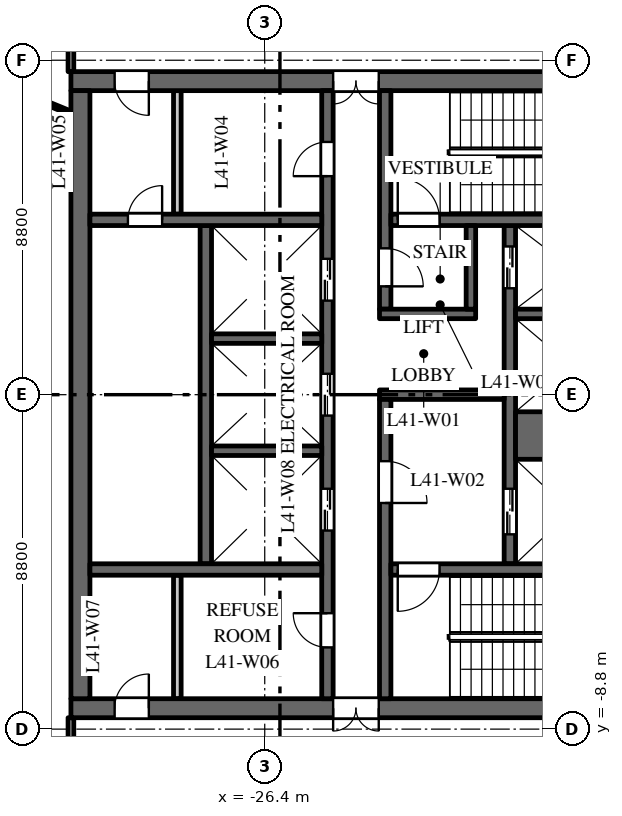
"""IFC4 building model, lengths in metres.
Left out: names, types, materials, properties, quantities, classifications, styles, units other than length and angle.
Written with IfcOpenShell. Run it as: python <this file> out.ifc"""

import sys

from ifc_helpers import new_model, si_unit, direction, frame, frame_2d, origin, place, context, subcontext, project, spatial, rectangle, extrude, element, fill, save


model = new_model("IFC4")
c1 = context("Model", 3, precision=1e-05, world=origin(), true_north=direction((0.0, 1.0)))
c2 = subcontext(c1, "Body", "Model", "MODEL_VIEW")
j1 = project(units=[si_unit("LENGTHUNIT", "METRE"), si_unit("PLANEANGLEUNIT", "RADIAN")], contexts=[c1])
p1 = place(None, origin())
s1 = spatial("IfcSite", under=j1, at=p1, CompositionType="ELEMENT")
p2 = place(p1, origin())
s2 = spatial("IfcBuilding", under=s1, at=p2, CompositionType="ELEMENT")
p3 = place(p2, frame((0.0, 0.0, 178.0)))
s3 = spatial("IfcBuildingStorey", under=s2, at=p3, CompositionType="ELEMENT", Elevation=178.0)
p4 = place(p3, frame((-16.5, 8.25, 0.0), z_axis=(0.0, 0.0, 1.0), x_axis=(-1.0, 0.0, 0.0)))
e1 = element("IfcWall", 1, at=p4, inside=s3, PredefinedType="SHEAR", context=c2, shape_type="SweptSolid", body=[
    extrude(rectangle(XDim=15.0, YDim=0.5, at=frame_2d((7.5, 0.0))), origin(), (0.0, 0.0, 1.0), 3.7),
])
p5 = place(p4, frame((6.9, 0.0, 0.0)))
e2 = element("IfcOpeningElement", 2, at=p5, cuts=e1, PredefinedType="OPENING", context=c2, shape_type="SweptSolid", body=[
    extrude(rectangle(XDim=1.2, YDim=2.1, at=frame_2d((0.6, 1.05))), frame((0.0, 0.26, 0.0), z_axis=(0.0, -1.0, 0.0), x_axis=(1.0, 0.0, 0.0)), (0.0, 0.0, 1.0), 0.52),
])
p6 = place(p4, frame((12.95, 0.0, 0.0)))
e3 = element("IfcOpeningElement", 3, at=p6, cuts=e1, PredefinedType="OPENING", context=c2, shape_type="SweptSolid", body=[
    extrude(rectangle(XDim=0.9, YDim=2.1, at=frame_2d((0.45, 1.05))), frame((0.0, 0.26, 0.0), z_axis=(0.0, -1.0, 0.0), x_axis=(1.0, 0.0, 0.0)), (0.0, 0.0, 1.0), 0.52),
])
p7 = place(p3, frame((-16.5, -8.25, 0.0), z_axis=(0.0, 0.0, 1.0), x_axis=(-1.0, 0.0, 0.0)))
e4 = element("IfcWall", 4, at=p7, inside=s3, PredefinedType="SHEAR", context=c2, shape_type="SweptSolid", body=[
    extrude(rectangle(XDim=15.0, YDim=0.5, at=frame_2d((7.5, 0.0))), origin(), (0.0, 0.0, 1.0), 3.7),
])
p8 = place(p7, frame((6.9, 0.0, 0.0)))
e5 = element("IfcOpeningElement", 5, at=p8, cuts=e4, PredefinedType="OPENING", context=c2, shape_type="SweptSolid", body=[
    extrude(rectangle(XDim=1.2, YDim=2.1, at=frame_2d((0.6, 1.05))), frame((0.0, 0.26, 0.0), z_axis=(0.0, -1.0, 0.0), x_axis=(1.0, 0.0, 0.0)), (0.0, 0.0, 1.0), 0.52),
])
p9 = place(p7, frame((12.95, 0.0, 0.0)))
e6 = element("IfcOpeningElement", 6, at=p9, cuts=e4, PredefinedType="OPENING", context=c2, shape_type="SweptSolid", body=[
    extrude(rectangle(XDim=0.9, YDim=2.1, at=frame_2d((0.45, 1.05))), frame((0.0, 0.26, 0.0), z_axis=(0.0, -1.0, 0.0), x_axis=(1.0, 0.0, 0.0)), (0.0, 0.0, 1.0), 0.52),
])
p10 = place(p3, frame((-27.95, -4.45, 0.0), z_axis=(0.0, 0.0, 1.0), x_axis=(0.0, 1.0, 0.0)))
e7 = element("IfcWall", 7, at=p10, inside=s3, PredefinedType="SHEAR", context=c2, shape_type="SweptSolid", body=[
    extrude(rectangle(XDim=8.9, YDim=0.3, at=frame_2d((4.45, 0.0))), origin(), (0.0, 0.0, 1.0), 3.7),
])
p11 = place(p3, frame((-19.95, -4.45, 0.0), z_axis=(0.0, 0.0, 1.0), x_axis=(0.0, 1.0, 0.0)))
e8 = element("IfcWall", 8, at=p11, inside=s3, PredefinedType="SHEAR", context=c2, shape_type="SweptSolid", body=[
    extrude(rectangle(XDim=8.9, YDim=0.3, at=frame_2d((4.45, 0.0))), origin(), (0.0, 0.0, 1.0), 3.7),
])
p12 = place(p11, frame((0.775, 0.0, 0.0)))
e9 = element("IfcOpeningElement", 9, at=p12, cuts=e8, PredefinedType="OPENING", context=c2, shape_type="SweptSolid", body=[
    extrude(rectangle(XDim=1.2, YDim=2.1, at=frame_2d((0.6, 1.05))), frame((0.0, 0.16, 0.0), z_axis=(0.0, -1.0, 0.0), x_axis=(1.0, 0.0, 0.0)), (0.0, 0.0, 1.0), 0.32),
])
p13 = place(p11, frame((7.25, 0.0, 0.0)))
e10 = element("IfcOpeningElement", 10, at=p13, cuts=e8, PredefinedType="OPENING", context=c2, shape_type="SweptSolid", body=[
    extrude(rectangle(XDim=1.1, YDim=2.1, at=frame_2d((0.55, 1.05))), frame((0.0, 0.16, 0.0), z_axis=(0.0, -1.0, 0.0), x_axis=(1.0, 0.0, 0.0)), (0.0, 0.0, 1.0), 0.32),
])
p14 = place(p3, frame((-24.75, -8.0, 0.0), z_axis=(0.0, 0.0, 1.0), x_axis=(0.0, 1.0, 0.0)))
e11 = element("IfcWall", 11, at=p14, inside=s3, PredefinedType="SHEAR", context=c2, shape_type="SweptSolid", body=[
    extrude(rectangle(XDim=16.0, YDim=0.3, at=frame_2d((8.0, 0.0))), origin(), (0.0, 0.0, 1.0), 3.7),
])
p15 = place(p14, frame((4.425, 0.0, 0.0)))
e12 = element("IfcOpeningElement", 12, at=p15, cuts=e11, PredefinedType="OPENING", context=c2, shape_type="SweptSolid", body=[
    extrude(rectangle(XDim=1.1, YDim=2.1, at=frame_2d((0.55, 1.05))), frame((0.0, 0.16, 0.0), z_axis=(0.0, -1.0, 0.0), x_axis=(1.0, 0.0, 0.0)), (0.0, 0.0, 1.0), 0.32),
])
p16 = place(p14, frame((7.45, 0.0, 0.0)))
e13 = element("IfcOpeningElement", 13, at=p16, cuts=e11, PredefinedType="OPENING", context=c2, shape_type="SweptSolid", body=[
    extrude(rectangle(XDim=1.1, YDim=2.1, at=frame_2d((0.55, 1.05))), frame((0.0, 0.16, 0.0), z_axis=(0.0, -1.0, 0.0), x_axis=(1.0, 0.0, 0.0)), (0.0, 0.0, 1.0), 0.32),
])
p17 = place(p14, frame((10.475, 0.0, 0.0)))
e14 = element("IfcOpeningElement", 14, at=p17, cuts=e11, PredefinedType="OPENING", context=c2, shape_type="SweptSolid", body=[
    extrude(rectangle(XDim=1.1, YDim=2.1, at=frame_2d((0.55, 1.05))), frame((0.0, 0.16, 0.0), z_axis=(0.0, -1.0, 0.0), x_axis=(1.0, 0.0, 0.0)), (0.0, 0.0, 1.0), 0.32),
])
p18 = place(p14, frame((13.75, 0.0, 0.0)))
e15 = element("IfcOpeningElement", 15, at=p18, cuts=e11, PredefinedType="OPENING", context=c2, shape_type="SweptSolid", body=[
    extrude(rectangle(XDim=0.9, YDim=2.1, at=frame_2d((0.45, 1.05))), frame((0.0, 0.16, 0.0), z_axis=(0.0, -1.0, 0.0), x_axis=(1.0, 0.0, 0.0)), (0.0, 0.0, 1.0), 0.32),
])
p19 = place(p14, frame((1.35, 0.0, 0.0)))
e16 = element("IfcOpeningElement", 16, at=p19, cuts=e11, PredefinedType="OPENING", context=c2, shape_type="SweptSolid", body=[
    extrude(rectangle(XDim=0.9, YDim=2.1, at=frame_2d((0.45, 1.05))), frame((0.0, 0.16, 0.0), z_axis=(0.0, -1.0, 0.0), x_axis=(1.0, 0.0, 0.0)), (0.0, 0.0, 1.0), 0.32),
])
p20 = place(p3, frame((-20.1, 0.0, 0.0), z_axis=(0.0, 0.0, 1.0), x_axis=(-1.0, 0.0, 0.0)))
e17 = element("IfcWall", 17, at=p20, inside=s3, PredefinedType="SHEAR", context=c2, shape_type="SweptSolid", body=[
    extrude(rectangle(XDim=3.28, YDim=0.25, at=frame_2d((1.64, 0.0))), origin(), (0.0, 0.0, 1.0), 3.7),
])
p21 = place(p3, frame((-31.25, -8.0, 0.0), z_axis=(0.0, 0.0, 1.0), x_axis=(0.0, 1.0, 0.0)))
e18 = element("IfcWall", 18, at=p21, inside=s3, PredefinedType="SHEAR", context=c2, shape_type="SweptSolid", body=[
    extrude(rectangle(XDim=16.0, YDim=0.5, at=frame_2d((8.0, 0.0))), origin(), (0.0, 0.0, 1.0), 3.7),
])
p22 = place(p3, frame((-24.9, 4.6, 0.0), z_axis=(0.0, 0.0, 1.0), x_axis=(-1.0, 0.0, 0.0)))
e19 = element("IfcWall", 19, at=p22, inside=s3, PredefinedType="SHEAR", context=c2, shape_type="SweptSolid", body=[
    extrude(rectangle(XDim=6.1, YDim=0.3, at=frame_2d((3.05, 0.0))), origin(), (0.0, 0.0, 1.0), 3.7),
])
p23 = place(p22, frame((4.2, 0.0, 0.0)))
e20 = element("IfcOpeningElement", 20, at=p23, cuts=e19, PredefinedType="OPENING", context=c2, shape_type="SweptSolid", body=[
    extrude(rectangle(XDim=0.9, YDim=2.1, at=frame_2d((0.45, 1.05))), frame((0.0, 0.16, 0.0), z_axis=(0.0, -1.0, 0.0), x_axis=(1.0, 0.0, 0.0)), (0.0, 0.0, 1.0), 0.32),
])
for number, where, z_axis, x_axis in (
    (21, (-28.7, 4.75, 0.0), (0.0, 0.0, 1.0), (0.0, 1.0, 0.0)),
    (22, (-28.7, -8.0, 0.0), (0.0, 0.0, 1.0), (0.0, 1.0, 0.0)),
):
    element("IfcWall", number, at=place(p3, frame(where, z_axis=z_axis, x_axis=x_axis)), inside=s3, PredefinedType="PARTITIONING", context=c2, shape_type="SweptSolid", body=[
        extrude(rectangle(XDim=3.25, YDim=0.2, at=frame_2d((1.625, 0.0))), origin(), (0.0, 0.0, 1.0), 3.7),
    ])
p24 = place(p3, frame((-24.9, -4.6, 0.0), z_axis=(0.0, 0.0, 1.0), x_axis=(-1.0, 0.0, 0.0)))
e23 = element("IfcWall", 23, at=p24, inside=s3, PredefinedType="SHEAR", context=c2, shape_type="SweptSolid", body=[
    extrude(rectangle(XDim=6.1, YDim=0.3, at=frame_2d((3.05, 0.0))), origin(), (0.0, 0.0, 1.0), 3.7),
])
p25 = place(p3, frame((-16.9, -1.075, 0.0), z_axis=(0.0, 0.0, 1.0), x_axis=(-1.0, 0.0, 0.0)))
e24 = element("IfcWall", 24, at=p25, inside=s3, PredefinedType="SHEAR", context=c2, shape_type="SweptSolid", body=[
    extrude(rectangle(XDim=2.9, YDim=1.25, at=frame_2d((1.45, 0.0))), origin(), (0.0, 0.0, 1.0), 3.7),
])
for number, where, z_axis, x_axis in (
    (25, (-16.9, 2.125, 0.0), (0.0, 0.0, 1.0), (-1.0, 0.0, 0.0)),
    (26, (-24.9, -1.475, 0.0), (0.0, 0.0, 1.0), (-1.0, 0.0, 0.0)),
    (27, (-24.9, 1.475, 0.0), (0.0, 0.0, 1.0), (-1.0, 0.0, 0.0)),
):
    element("IfcWall", number, at=place(p3, frame(where, z_axis=z_axis, x_axis=x_axis)), inside=s3, PredefinedType="SHEAR", context=c2, shape_type="SweptSolid", body=[
        extrude(rectangle(XDim=2.9, YDim=0.25, at=frame_2d((1.45, 0.0))), origin(), (0.0, 0.0, 1.0), 3.7),
    ])
p26 = place(p3, frame((-23.23, 2.25, 0.0), z_axis=(0.0, 0.0, 1.0), x_axis=(0.0, 1.0, 0.0)))
e28 = element("IfcWall", 28, at=p26, inside=s3, PredefinedType="SHEAR", context=c2, shape_type="SweptSolid", body=[
    extrude(rectangle(XDim=5.75, YDim=0.3, at=frame_2d((2.875, 0.0))), origin(), (0.0, 0.0, 1.0), 3.7),
])
p27 = place(p26, frame((0.6, 0.0, 0.0)))
e29 = element("IfcOpeningElement", 29, at=p27, cuts=e28, PredefinedType="OPENING", context=c2, shape_type="SweptSolid", body=[
    extrude(rectangle(XDim=1.0, YDim=2.1, at=frame_2d((0.5, 1.05))), frame((0.0, 0.16, 0.0), z_axis=(0.0, -1.0, 0.0), x_axis=(1.0, 0.0, 0.0)), (0.0, 0.0, 1.0), 0.32),
])
p28 = place(p3, frame((-23.23, -8.0, 0.0), z_axis=(0.0, 0.0, 1.0), x_axis=(0.0, 1.0, 0.0)))
e30 = element("IfcWall", 30, at=p28, inside=s3, PredefinedType="SHEAR", context=c2, shape_type="SweptSolid", body=[
    extrude(rectangle(XDim=7.875, YDim=0.3, at=frame_2d((3.938, 0.0))), origin(), (0.0, 0.0, 1.0), 3.7),
])
p29 = place(p28, frame((5.15, 0.0, 0.0)))
e31 = element("IfcOpeningElement", 31, at=p29, cuts=e30, PredefinedType="OPENING", context=c2, shape_type="SweptSolid", body=[
    extrude(rectangle(XDim=1.1, YDim=2.1, at=frame_2d((0.55, 1.05))), frame((0.0, 0.16, 0.0), z_axis=(0.0, -1.0, 0.0), x_axis=(1.0, 0.0, 0.0)), (0.0, 0.0, 1.0), 0.32),
])
p30 = place(p3, frame((-16.9, 4.6, 0.0), z_axis=(0.0, 0.0, 1.0), x_axis=(-1.0, 0.0, 0.0)))
e32 = element("IfcWall", 32, at=p30, inside=s3, PredefinedType="SHEAR", context=c2, shape_type="SweptSolid", body=[
    extrude(rectangle(XDim=6.18, YDim=0.3, at=frame_2d((3.09, 0.0))), origin(), (0.0, 0.0, 1.0), 3.7),
])
p31 = place(p30, frame((4.9, 0.0, 0.0)))
e33 = element("IfcOpeningElement", 33, at=p31, cuts=e32, PredefinedType="OPENING", context=c2, shape_type="SweptSolid", body=[
    extrude(rectangle(XDim=1.1, YDim=2.1, at=frame_2d((0.55, 1.05))), frame((0.0, 0.16, 0.0), z_axis=(0.0, -1.0, 0.0), x_axis=(1.0, 0.0, 0.0)), (0.0, 0.0, 1.0), 0.32),
])
p32 = place(p3, frame((-16.9, -4.6, 0.0), z_axis=(0.0, 0.0, 1.0), x_axis=(-1.0, 0.0, 0.0)))
e34 = element("IfcWall", 34, at=p32, inside=s3, PredefinedType="SHEAR", context=c2, shape_type="SweptSolid", body=[
    extrude(rectangle(XDim=6.18, YDim=0.3, at=frame_2d((3.09, 0.0))), origin(), (0.0, 0.0, 1.0), 3.7),
])
p33 = place(p32, frame((4.9, 0.0, 0.0)))
e35 = element("IfcOpeningElement", 35, at=p33, cuts=e34, PredefinedType="OPENING", context=c2, shape_type="SweptSolid", body=[
    extrude(rectangle(XDim=1.1, YDim=2.1, at=frame_2d((0.55, 1.05))), frame((0.0, 0.16, 0.0), z_axis=(0.0, -1.0, 0.0), x_axis=(1.0, 0.0, 0.0)), (0.0, 0.0, 1.0), 0.32),
])
p34 = place(p3, frame((-20.85, 2.125, 0.0), z_axis=(0.0, 0.0, 1.0), x_axis=(-1.0, 0.0, 0.0)))
e36 = element("IfcWall", 36, at=p34, inside=s3, PredefinedType="SHEAR", context=c2, shape_type="SweptSolid", body=[
    extrude(rectangle(XDim=2.53, YDim=0.25, at=frame_2d((1.265, 0.0))), origin(), (0.0, 0.0, 1.0), 3.7),
])
p35 = place(p3, frame((-20.975, 2.25, 0.0), z_axis=(0.0, 0.0, 1.0), x_axis=(0.0, 1.0, 0.0)))
e37 = element("IfcWall", 37, at=p35, inside=s3, PredefinedType="SHEAR", context=c2, shape_type="SweptSolid", body=[
    extrude(rectangle(XDim=2.2, YDim=0.25, at=frame_2d((1.1, 0.0))), origin(), (0.0, 0.0, 1.0), 3.7),
])
p36 = place(p3, frame((-34.234, 8.53, 0.0), z_axis=(0.0, 0.0, 1.0), x_axis=(0.925344112436, -0.379128307542, 0.0)))
e38 = element("IfcWall", 38, at=p36, inside=s3, PredefinedType="PARTITIONING", context=c2, shape_type="SweptSolid", body=[
    extrude(rectangle(XDim=2.954, YDim=0.1, at=frame_2d((1.477, 0.0))), origin(), (0.0, 0.0, 1.0), 2.9),
])
for number, where, z_axis, x_axis in (
    (39, (-31.5, -10.7, 0.0), (0.0, 0.0, 1.0), (0.0, 1.0, 0.0)),
    (40, (-31.5, 8.5, 0.0), (0.0, 0.0, 1.0), (0.0, 1.0, 0.0)),
):
    element("IfcWall", number, at=place(p3, frame(where, z_axis=z_axis, x_axis=x_axis)), inside=s3, PredefinedType="PARTITIONING", context=c2, shape_type="SweptSolid", body=[
        extrude(rectangle(XDim=2.2, YDim=0.15, at=frame_2d((1.1, 0.0))), origin(), (0.0, 0.0, 1.0), 3.7),
    ])
p37 = place(p12, origin())
e41 = element("IfcDoor", 41, at=p37, inside=s3, OperationType="DOUBLE_DOOR_SLIDING", PredefinedType="DOOR", context=c2, shape_type="SweptSolid", body=[
    extrude(rectangle(XDim=1.2, YDim=2.1, at=frame_2d((0.6, 1.05))), frame((0.0, 0.025, 0.0), z_axis=(0.0, -1.0, 0.0), x_axis=(1.0, 0.0, 0.0)), (0.0, 0.0, 1.0), 0.05),
])
fill(e9, e41)
p38 = place(p13, origin())
e42 = element("IfcDoor", 42, at=p38, inside=s3, OperationType="DOUBLE_DOOR_SLIDING", PredefinedType="DOOR", context=c2, shape_type="SweptSolid", body=[
    extrude(rectangle(XDim=1.1, YDim=2.1, at=frame_2d((0.55, 1.05))), frame((0.0, 0.025, 0.0), z_axis=(0.0, -1.0, 0.0), x_axis=(1.0, 0.0, 0.0)), (0.0, 0.0, 1.0), 0.05),
])
fill(e10, e42)
p39 = place(p15, origin())
e43 = element("IfcDoor", 43, at=p39, inside=s3, OperationType="DOUBLE_DOOR_SLIDING", PredefinedType="DOOR", context=c2, shape_type="SweptSolid", body=[
    extrude(rectangle(XDim=1.1, YDim=2.1, at=frame_2d((0.55, 1.05))), frame((0.0, 0.025, 0.0), z_axis=(0.0, -1.0, 0.0), x_axis=(1.0, 0.0, 0.0)), (0.0, 0.0, 1.0), 0.05),
])
fill(e12, e43)
p40 = place(p16, origin())
e44 = element("IfcDoor", 44, at=p40, inside=s3, OperationType="DOUBLE_DOOR_SLIDING", PredefinedType="DOOR", context=c2, shape_type="SweptSolid", body=[
    extrude(rectangle(XDim=1.1, YDim=2.1, at=frame_2d((0.55, 1.05))), frame((0.0, 0.025, 0.0), z_axis=(0.0, -1.0, 0.0), x_axis=(1.0, 0.0, 0.0)), (0.0, 0.0, 1.0), 0.05),
])
fill(e13, e44)
p41 = place(p17, origin())
e45 = element("IfcDoor", 45, at=p41, inside=s3, OperationType="DOUBLE_DOOR_SLIDING", PredefinedType="DOOR", context=c2, shape_type="SweptSolid", body=[
    extrude(rectangle(XDim=1.1, YDim=2.1, at=frame_2d((0.55, 1.05))), frame((0.0, 0.025, 0.0), z_axis=(0.0, -1.0, 0.0), x_axis=(1.0, 0.0, 0.0)), (0.0, 0.0, 1.0), 0.05),
])
fill(e14, e45)
p42 = place(p31, origin())
e46 = element("IfcDoor", 46, at=p42, inside=s3, OperationType="SINGLE_SWING_RIGHT", PredefinedType="DOOR", context=c2, shape_type="SweptSolid", body=[
    extrude(rectangle(XDim=1.1, YDim=2.1, at=frame_2d((0.55, 1.05))), frame((0.0, 0.025, 0.0), z_axis=(0.0, -1.0, 0.0), x_axis=(1.0, 0.0, 0.0)), (0.0, 0.0, 1.0), 0.05),
])
fill(e33, e46)
p43 = place(p33, origin())
e47 = element("IfcDoor", 47, at=p43, inside=s3, OperationType="SINGLE_SWING_LEFT", PredefinedType="DOOR", context=c2, shape_type="SweptSolid", body=[
    extrude(rectangle(XDim=1.1, YDim=2.1, at=frame_2d((0.55, 1.05))), frame((0.0, 0.025, 0.0), z_axis=(0.0, -1.0, 0.0), x_axis=(1.0, 0.0, 0.0)), (0.0, 0.0, 1.0), 0.05),
])
fill(e35, e47)
p44 = place(p29, origin())
e48 = element("IfcDoor", 48, at=p44, inside=s3, OperationType="SINGLE_SWING_LEFT", PredefinedType="DOOR", context=c2, shape_type="SweptSolid", body=[
    extrude(rectangle(XDim=1.1, YDim=2.1, at=frame_2d((0.55, 1.05))), frame((0.0, 0.025, 0.0), z_axis=(0.0, -1.0, 0.0), x_axis=(1.0, 0.0, 0.0)), (0.0, 0.0, 1.0), 0.05),
])
fill(e31, e48)
p45 = place(p27, origin())
e49 = element("IfcDoor", 49, at=p45, inside=s3, OperationType="SINGLE_SWING_LEFT", PredefinedType="DOOR", context=c2, shape_type="SweptSolid", body=[
    extrude(rectangle(XDim=1.0, YDim=2.1, at=frame_2d((0.5, 1.05))), frame((0.0, 0.025, 0.0), z_axis=(0.0, -1.0, 0.0), x_axis=(1.0, 0.0, 0.0)), (0.0, 0.0, 1.0), 0.05),
])
fill(e29, e49)
p46 = place(p5, origin())
e50 = element("IfcDoor", 50, at=p46, inside=s3, OperationType="DOUBLE_DOOR_DOUBLE_SWING", PredefinedType="DOOR", context=c2, shape_type="SweptSolid", body=[
    extrude(rectangle(XDim=1.2, YDim=2.1, at=frame_2d((0.6, 1.05))), frame((0.0, 0.025, 0.0), z_axis=(0.0, -1.0, 0.0), x_axis=(1.0, 0.0, 0.0)), (0.0, 0.0, 1.0), 0.05),
])
fill(e2, e50)
p47 = place(p8, origin())
e51 = element("IfcDoor", 51, at=p47, inside=s3, OperationType="DOUBLE_DOOR_DOUBLE_SWING", PredefinedType="DOOR", context=c2, shape_type="SweptSolid", body=[
    extrude(rectangle(XDim=1.2, YDim=2.1, at=frame_2d((0.6, 1.05))), frame((0.0, 0.025, 0.0), z_axis=(0.0, -1.0, 0.0), x_axis=(1.0, 0.0, 0.0)), (0.0, 0.0, 1.0), 0.05),
])
fill(e5, e51)
p48 = place(p18, origin())
e52 = element("IfcDoor", 52, at=p48, inside=s3, OperationType="SINGLE_SWING_RIGHT", PredefinedType="DOOR", context=c2, shape_type="SweptSolid", body=[
    extrude(rectangle(XDim=0.9, YDim=2.1, at=frame_2d((0.45, 1.05))), frame((0.0, 0.025, 0.0), z_axis=(0.0, -1.0, 0.0), x_axis=(1.0, 0.0, 0.0)), (0.0, 0.0, 1.0), 0.05),
])
fill(e15, e52)
p49 = place(p6, origin())
e53 = element("IfcDoor", 53, at=p49, inside=s3, OperationType="SINGLE_SWING_RIGHT", PredefinedType="DOOR", context=c2, shape_type="SweptSolid", body=[
    extrude(rectangle(XDim=0.9, YDim=2.1, at=frame_2d((0.45, 1.05))), frame((0.0, 0.025, 0.0), z_axis=(0.0, -1.0, 0.0), x_axis=(1.0, 0.0, 0.0)), (0.0, 0.0, 1.0), 0.05),
])
fill(e3, e53)
p50 = place(p19, origin())
e54 = element("IfcDoor", 54, at=p50, inside=s3, OperationType="SINGLE_SWING_LEFT", PredefinedType="DOOR", context=c2, shape_type="SweptSolid", body=[
    extrude(rectangle(XDim=0.9, YDim=2.1, at=frame_2d((0.45, 1.05))), frame((0.0, 0.025, 0.0), z_axis=(0.0, -1.0, 0.0), x_axis=(1.0, 0.0, 0.0)), (0.0, 0.0, 1.0), 0.05),
])
fill(e16, e54)
p51 = place(p9, origin())
e55 = element("IfcDoor", 55, at=p51, inside=s3, OperationType="SINGLE_SWING_LEFT", PredefinedType="DOOR", context=c2, shape_type="SweptSolid", body=[
    extrude(rectangle(XDim=0.9, YDim=2.1, at=frame_2d((0.45, 1.05))), frame((0.0, 0.025, 0.0), z_axis=(0.0, -1.0, 0.0), x_axis=(1.0, 0.0, 0.0)), (0.0, 0.0, 1.0), 0.05),
])
fill(e6, e55)
p52 = place(p23, origin())
e56 = element("IfcDoor", 56, at=p52, inside=s3, OperationType="SINGLE_SWING_LEFT", PredefinedType="DOOR", context=c2, shape_type="SweptSolid", body=[
    extrude(rectangle(XDim=0.9, YDim=2.1, at=frame_2d((0.45, 1.05))), frame((0.0, 0.025, 0.0), z_axis=(0.0, -1.0, 0.0), x_axis=(1.0, 0.0, 0.0)), (0.0, 0.0, 1.0), 0.05),
])
fill(e20, e56)
save(model, sys.argv[1])
